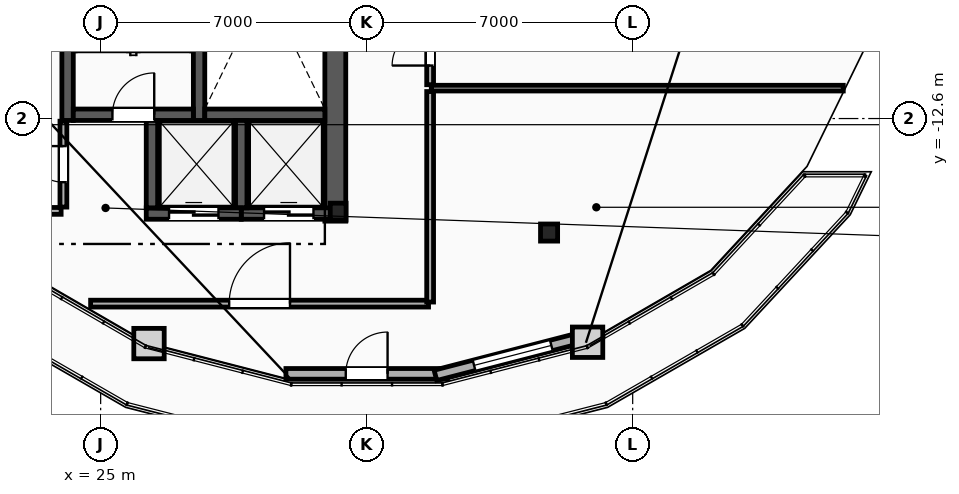
"""IFC4 building model, lengths in metres.
Left out: names, types, materials, properties, quantities, classifications, styles, units other than length and angle.
Written with IfcOpenShell. Run it as: python <this file> out.ifc"""

import sys

from ifc_helpers import new_model, si_unit, direction, frame, frame_2d, origin, origin_2d, place, context, subcontext, project, spatial, rectangle, hollow_rectangle, i_section, extrude, element, fill, save


model = new_model("IFC4")
c1 = context("Model", 3, precision=1e-05, world=origin(), true_north=direction((0.0, 1.0)))
c2 = subcontext(c1, "Body", "Model", "MODEL_VIEW")
j1 = project(units=[si_unit("LENGTHUNIT", "METRE"), si_unit("PLANEANGLEUNIT", "RADIAN")], contexts=[c1])
p1 = place(None, origin())
s1 = spatial("IfcSite", under=j1, at=p1, CompositionType="ELEMENT")
p2 = place(p1, origin())
s2 = spatial("IfcBuilding", under=s1, at=p2, CompositionType="ELEMENT")
p3 = place(p2, frame((0.0, 0.0, 282.8)))
s3 = spatial("IfcBuildingStorey", under=s2, at=p3, CompositionType="ELEMENT", Elevation=282.8)
p4 = place(p3, frame((31.25, -15.05, 0.0), z_axis=(0.0, 0.0, 1.0), x_axis=(1.0, 0.0, 0.0)))
e1 = element("IfcColumn", 1, at=p4, inside=s3, PredefinedType="COLUMN", context=c2, shape_type="SweptSolid", body=[
    extrude(i_section(OverallWidth=0.416, OverallDepth=0.446, WebThickness=0.039, FlangeThickness=0.063, FilletRadius=0.018, at=origin_2d()), origin(), (0.0, 0.0, 1.0), 3.6),
])
p5 = place(p3, frame((36.8, -15.6, 0.0), z_axis=(0.0, 0.0, 1.0), x_axis=(1.0, 0.0, 0.0)))
e2 = element("IfcColumn", 2, at=p5, inside=s3, PredefinedType="COLUMN", context=c2, shape_type="SweptSolid", body=[
    extrude(hollow_rectangle(XDim=0.45, YDim=0.45, WallThickness=0.025, at=origin_2d()), origin(), (0.0, 0.0, 1.0), 3.6),
])
p6 = place(p3, frame((29.875, -19.318, 0.0), z_axis=(0.0, 0.0, 1.0), x_axis=(1.0, 0.0, 0.0)))
e3 = element("IfcWall", 3, at=p6, inside=s3, PredefinedType="SOLIDWALL", context=c2, shape_type="SweptSolid", body=[
    extrude(rectangle(XDim=4.25, YDim=0.28, at=frame_2d((2.125, 0.0))), origin(), (0.0, 0.0, 1.0), 3.34),
])
p7 = place(p6, frame((1.575, 0.0, 0.0)))
e4 = element("IfcOpeningElement", 4, at=p7, cuts=e3, PredefinedType="OPENING", context=c2, shape_type="SweptSolid", body=[
    extrude(rectangle(XDim=1.1, YDim=2.2, at=frame_2d((0.55, 1.1))), frame((0.0, 0.15, 0.0), z_axis=(0.0, -1.0, 0.0), x_axis=(1.0, 0.0, 0.0)), (0.0, 0.0, 1.0), 0.3),
])
p8 = place(p3, frame((33.81, -19.358, 0.0), z_axis=(0.0, 0.0, 1.0), x_axis=(0.968211504127, 0.250132931211, 0.0)))
e5 = element("IfcWall", 5, at=p8, inside=s3, PredefinedType="SOLIDWALL", context=c2, shape_type="SweptSolid", body=[
    extrude(rectangle(XDim=4.2, YDim=0.28, at=frame_2d((2.1, 0.0))), origin(), (0.0, 0.0, 1.0), 3.34),
])
p9 = place(p8, frame((1.05, 0.0, 0.3)))
e6 = element("IfcOpeningElement", 6, at=p9, cuts=e5, PredefinedType="OPENING", context=c2, shape_type="SweptSolid", body=[
    extrude(rectangle(XDim=2.1, YDim=2.6, at=frame_2d((1.05, 1.3))), frame((0.0, 0.15, 0.0), z_axis=(0.0, -1.0, 0.0), x_axis=(1.0, 0.0, 0.0)), (0.0, 0.0, 1.0), 0.3),
])
p10 = place(p3, frame((31.175, -15.3, 0.0), z_axis=(0.0, 0.0, 1.0), x_axis=(0.0, 1.0, 0.0)))
e7 = element("IfcWall", 7, at=p10, inside=s3, PredefinedType="SHEAR", context=c2, shape_type="SweptSolid", body=[
    extrude(rectangle(XDim=13.33, YDim=0.55, at=frame_2d((6.665, 0.0))), origin(), (0.0, 0.0, 1.0), 3.34),
])
for number, where, z_axis, x_axis in (
    (8, (27.59, -12.65, 0.0), (0.0, 0.0, 1.0), (0.0, 1.0, 0.0)),
    (9, (24.13, -12.65, 0.0), (0.0, 0.0, 1.0), (0.0, 1.0, 0.0)),
):
    element("IfcWall", number, at=place(p3, frame(where, z_axis=z_axis, x_axis=x_axis)), inside=s3, PredefinedType="SHEAR", context=c2, shape_type="SweptSolid", body=[
        extrude(rectangle(XDim=10.68, YDim=0.3, at=frame_2d((5.34, 0.0))), origin(), (0.0, 0.0, 1.0), 3.34),
    ])
p11 = place(p3, frame((27.74, -12.5, 0.0), z_axis=(0.0, 0.0, 1.0), x_axis=(1.0, 0.0, 0.0)))
e10 = element("IfcWall", 10, at=p11, inside=s3, PredefinedType="SHEAR", context=c2, shape_type="SweptSolid", body=[
    extrude(rectangle(XDim=3.16, YDim=0.3, at=frame_2d((1.58, 0.0))), origin(), (0.0, 0.0, 1.0), 3.34),
])
p12 = place(p3, frame((24.28, -12.5, 0.0), z_axis=(0.0, 0.0, 1.0), x_axis=(1.0, 0.0, 0.0)))
e11 = element("IfcWall", 11, at=p12, inside=s3, PredefinedType="SHEAR", context=c2, shape_type="SweptSolid", body=[
    extrude(rectangle(XDim=3.16, YDim=0.3, at=frame_2d((1.58, 0.0))), origin(), (0.0, 0.0, 1.0), 3.34),
])
p13 = place(p12, frame((1.03, 0.0, 0.0)))
e12 = element("IfcOpeningElement", 12, at=p13, cuts=e11, PredefinedType="OPENING", context=c2, shape_type="SweptSolid", body=[
    extrude(rectangle(XDim=1.1, YDim=2.15, at=frame_2d((0.55, 1.075))), frame((0.0, 0.16, 0.0), z_axis=(0.0, -1.0, 0.0), x_axis=(1.0, 0.0, 0.0)), (0.0, 0.0, 1.0), 0.32),
])
p14 = place(p3, frame((28.7, -15.1, 0.0), z_axis=(0.0, 0.0, 1.0), x_axis=(1.0, 0.0, 0.0)))
e13 = element("IfcWall", 13, at=p14, inside=s3, PredefinedType="SHEAR", context=c2, shape_type="SweptSolid", body=[
    extrude(rectangle(XDim=2.5, YDim=0.3, at=frame_2d((1.25, 0.0))), origin(), (0.0, 0.0, 1.0), 3.34),
])
p15 = place(p14, frame((0.6, 0.0, 0.0)))
e14 = element("IfcOpeningElement", 14, at=p15, cuts=e13, PredefinedType="OPENING", context=c2, shape_type="SweptSolid", body=[
    extrude(rectangle(XDim=1.3, YDim=2.2, at=frame_2d((0.65, 1.1))), frame((0.0, 0.16, 0.0), z_axis=(0.0, -1.0, 0.0), x_axis=(1.0, 0.0, 0.0)), (0.0, 0.0, 1.0), 0.32),
])
p16 = place(p3, frame((28.7, -14.95, 0.0), z_axis=(0.0, 0.0, 1.0), x_axis=(0.0, 1.0, 0.0)))
e15 = element("IfcWall", 15, at=p16, inside=s3, PredefinedType="SHEAR", context=c2, shape_type="SweptSolid", body=[
    extrude(rectangle(XDim=2.3, YDim=0.3, at=frame_2d((1.15, 0.0))), origin(), (0.0, 0.0, 1.0), 3.34),
])
p17 = place(p3, frame((26.2, -15.1, 0.0), z_axis=(0.0, 0.0, 1.0), x_axis=(1.0, 0.0, 0.0)))
e16 = element("IfcWall", 16, at=p17, inside=s3, PredefinedType="SHEAR", context=c2, shape_type="SweptSolid", body=[
    extrude(rectangle(XDim=2.5, YDim=0.3, at=frame_2d((1.25, 0.0))), origin(), (0.0, 0.0, 1.0), 3.34),
])
p18 = place(p17, frame((0.6, 0.0, 0.0)))
e17 = element("IfcOpeningElement", 17, at=p18, cuts=e16, PredefinedType="OPENING", context=c2, shape_type="SweptSolid", body=[
    extrude(rectangle(XDim=1.3, YDim=2.2, at=frame_2d((0.65, 1.1))), frame((0.0, 0.16, 0.0), z_axis=(0.0, -1.0, 0.0), x_axis=(1.0, 0.0, 0.0)), (0.0, 0.0, 1.0), 0.32),
])
p19 = place(p3, frame((26.35, -14.95, 0.0), z_axis=(0.0, 0.0, 1.0), x_axis=(0.0, 1.0, 0.0)))
e18 = element("IfcWall", 18, at=p19, inside=s3, PredefinedType="SHEAR", context=c2, shape_type="SweptSolid", body=[
    extrude(rectangle(XDim=2.3, YDim=0.3, at=frame_2d((1.15, 0.0))), origin(), (0.0, 0.0, 1.0), 3.34),
])
p20 = place(p3, frame((21.35, -15.03, 0.0), z_axis=(0.0, 0.0, 1.0), x_axis=(1.0, 0.0, 0.0)))
e19 = element("IfcWall", 19, at=p20, inside=s3, PredefinedType="PARTITIONING", context=c2, shape_type="SweptSolid", body=[
    extrude(rectangle(XDim=2.61, YDim=0.18, at=frame_2d((1.305, 0.0))), origin(), (0.0, 0.0, 1.0), 2.413),
])
p21 = place(p3, frame((24.02, -14.93, 0.0), z_axis=(0.0, 0.0, 1.0), x_axis=(0.0, 1.0, 0.0)))
e20 = element("IfcWall", 20, at=p21, inside=s3, PredefinedType="PARTITIONING", context=c2, shape_type="SweptSolid", body=[
    extrude(rectangle(XDim=2.26, YDim=0.18, at=frame_2d((1.13, 0.0))), origin(), (0.0, 0.0, 1.0), 3.34),
])
p22 = place(p21, frame((0.655, 0.0, 0.0)))
e21 = element("IfcOpeningElement", 21, at=p22, cuts=e20, PredefinedType="OPENING", context=c2, shape_type="SweptSolid", body=[
    extrude(rectangle(XDim=0.95, YDim=2.1, at=frame_2d((0.475, 1.05))), frame((0.0, 0.1, 0.0), z_axis=(0.0, -1.0, 0.0), x_axis=(1.0, 0.0, 0.0)), (0.0, 0.0, 1.0), 0.2),
])
p23 = place(p3, frame((33.7, -11.8, 0.0), z_axis=(0.0, 0.0, 1.0), x_axis=(1.0, 0.0, 0.0)))
e22 = element("IfcWall", 22, at=p23, inside=s3, PredefinedType="PARTITIONING", context=c2, shape_type="SweptSolid", body=[
    extrude(rectangle(XDim=10.842, YDim=0.15, at=frame_2d((5.421, 0.0))), origin(), (0.0, 0.0, 1.0), 3.34),
])
p24 = place(p3, frame((24.736, -17.47, 0.0), z_axis=(0.0, 0.0, 1.0), x_axis=(1.0, 0.0, 0.0)))
e23 = element("IfcWall", 23, at=p24, inside=s3, PredefinedType="PARTITIONING", context=c2, shape_type="SweptSolid", body=[
    extrude(rectangle(XDim=8.892, YDim=0.18, at=frame_2d((4.446, 0.0))), origin(), (0.0, 0.0, 1.0), 3.34),
])
p25 = place(p24, frame((3.646, 0.0, 0.0)))
e24 = element("IfcOpeningElement", 24, at=p25, cuts=e23, PredefinedType="OPENING", context=c2, shape_type="SweptSolid", body=[
    extrude(rectangle(XDim=1.6, YDim=2.2, at=frame_2d((0.8, 1.1))), frame((0.0, 0.1, 0.0), z_axis=(0.0, -1.0, 0.0), x_axis=(1.0, 0.0, 0.0)), (0.0, 0.0, 1.0), 0.2),
])
p26 = place(p3, frame((33.67, -17.428, 0.0), z_axis=(0.0, 0.0, 1.0), x_axis=(0.0, 1.0, 0.0)))
e25 = element("IfcWall", 25, at=p26, inside=s3, PredefinedType="PARTITIONING", context=c2, shape_type="SweptSolid", body=[
    extrude(rectangle(XDim=5.539, YDim=0.18, at=frame_2d((2.769, 0.0))), origin(), (0.0, 0.0, 1.0), 3.34),
])
p27 = place(p3, frame((33.67, -11.71, 0.0), z_axis=(0.0, 0.0, 1.0), x_axis=(0.0, 1.0, 0.0)))
e26 = element("IfcWall", 26, at=p27, inside=s3, PredefinedType="PARTITIONING", context=c2, shape_type="SweptSolid", body=[
    extrude(rectangle(XDim=2.009, YDim=0.18, at=frame_2d((1.004, 0.0))), origin(), (0.0, 0.0, 1.0), 3.34),
])
p28 = place(p27, frame((0.504, 0.0, 0.0)))
e27 = element("IfcOpeningElement", 27, at=p28, cuts=e26, PredefinedType="OPENING", context=c2, shape_type="SweptSolid", body=[
    extrude(rectangle(XDim=1.0, YDim=2.15, at=frame_2d((0.5, 1.075))), frame((0.0, 0.1, 0.0), z_axis=(0.0, -1.0, 0.0), x_axis=(1.0, 0.0, 0.0)), (0.0, 0.0, 1.0), 0.2),
])
p29 = place(p7, origin())
e28 = element("IfcDoor", 28, at=p29, inside=s3, OperationType="SINGLE_SWING_RIGHT", PredefinedType="DOOR", context=c2, shape_type="SweptSolid", body=[
    extrude(rectangle(XDim=1.1, YDim=2.2, at=frame_2d((0.55, 1.1))), frame((0.0, 0.025, 0.0), z_axis=(0.0, -1.0, 0.0), x_axis=(1.0, 0.0, 0.0)), (0.0, 0.0, 1.0), 0.05),
])
fill(e4, e28)
p30 = place(p9, origin())
e29 = element("IfcWindow", 29, at=p30, inside=s3, PartitioningType="SINGLE_PANEL", PredefinedType="WINDOW", context=c2, shape_type="SweptSolid", body=[
    extrude(rectangle(XDim=2.1, YDim=2.6, at=frame_2d((1.05, 1.3))), frame((0.0, 0.03, 0.0), z_axis=(0.0, -1.0, 0.0), x_axis=(1.0, 0.0, 0.0)), (0.0, 0.0, 1.0), 0.06),
])
fill(e6, e29)
p31 = place(p13, origin())
e30 = element("IfcDoor", 30, at=p31, inside=s3, OperationType="SINGLE_SWING_RIGHT", PredefinedType="DOOR", context=c2, shape_type="SweptSolid", body=[
    extrude(rectangle(XDim=1.1, YDim=2.15, at=frame_2d((0.55, 1.075))), frame((0.0, 0.025, 0.0), z_axis=(0.0, -1.0, 0.0), x_axis=(1.0, 0.0, 0.0)), (0.0, 0.0, 1.0), 0.05),
])
fill(e12, e30)
p32 = place(p15, origin())
e31 = element("IfcDoor", 31, at=p32, inside=s3, OperationType="SLIDING_TO_LEFT", PredefinedType="TRAPDOOR", context=c2, shape_type="SweptSolid", body=[
    extrude(rectangle(XDim=1.3, YDim=2.2, at=frame_2d((0.65, 1.1))), frame((0.0, 0.025, 0.0), z_axis=(0.0, -1.0, 0.0), x_axis=(1.0, 0.0, 0.0)), (0.0, 0.0, 1.0), 0.05),
])
fill(e14, e31)
p33 = place(p18, origin())
e32 = element("IfcDoor", 32, at=p33, inside=s3, OperationType="SLIDING_TO_LEFT", PredefinedType="TRAPDOOR", context=c2, shape_type="SweptSolid", body=[
    extrude(rectangle(XDim=1.3, YDim=2.2, at=frame_2d((0.65, 1.1))), frame((0.0, 0.025, 0.0), z_axis=(0.0, -1.0, 0.0), x_axis=(1.0, 0.0, 0.0)), (0.0, 0.0, 1.0), 0.05),
])
fill(e17, e32)
p34 = place(p25, origin())
e33 = element("IfcDoor", 33, at=p34, inside=s3, OperationType="SINGLE_SWING_RIGHT", PredefinedType="DOOR", context=c2, shape_type="SweptSolid", body=[
    extrude(rectangle(XDim=1.6, YDim=2.2, at=frame_2d((0.8, 1.1))), frame((0.0, 0.025, 0.0), z_axis=(0.0, -1.0, 0.0), x_axis=(1.0, 0.0, 0.0)), (0.0, 0.0, 1.0), 0.05),
])
fill(e24, e33)
p35 = place(p22, origin())
e34 = element("IfcDoor", 34, at=p35, inside=s3, OperationType="SINGLE_SWING_RIGHT", PredefinedType="DOOR", context=c2, shape_type="SweptSolid", body=[
    extrude(rectangle(XDim=0.95, YDim=2.1, at=frame_2d((0.475, 1.05))), frame((0.0, 0.025, 0.0), z_axis=(0.0, -1.0, 0.0), x_axis=(1.0, 0.0, 0.0)), (0.0, 0.0, 1.0), 0.05),
])
fill(e21, e34)
p36 = place(p28, origin())
e35 = element("IfcDoor", 35, at=p36, inside=s3, OperationType="SINGLE_SWING_LEFT", PredefinedType="DOOR", context=c2, shape_type="SweptSolid", body=[
    extrude(rectangle(XDim=1.0, YDim=2.15, at=frame_2d((0.5, 1.075))), frame((0.0, 0.025, 0.0), z_axis=(0.0, -1.0, 0.0), x_axis=(1.0, 0.0, 0.0)), (0.0, 0.0, 1.0), 0.05),
])
fill(e27, e35)
save(model, sys.argv[1])
